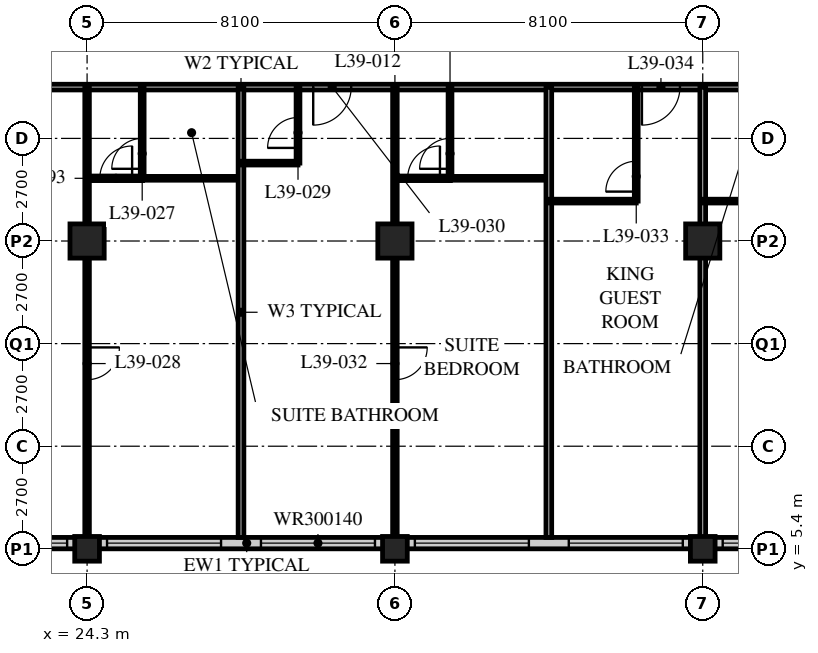
"""IFC4 building model, lengths in metres.
Left out: names, types, materials, properties, quantities, classifications, styles, units other than length and angle.
Written with IfcOpenShell. Run it as: python <this file> out.ifc"""

import sys

from ifc_helpers import new_model, si_unit, direction, frame, frame_2d, origin, origin_2d, place, context, subcontext, project, spatial, rectangle, hollow_rectangle, extrude, element, fill, save


model = new_model("IFC4")
c1 = context("Model", 3, precision=1e-05, world=origin(), true_north=direction((0.0, 1.0)))
c2 = subcontext(c1, "Body", "Model", "MODEL_VIEW")
j1 = project(units=[si_unit("LENGTHUNIT", "METRE"), si_unit("PLANEANGLEUNIT", "RADIAN")], contexts=[c1])
p1 = place(None, origin())
s1 = spatial("IfcSite", under=j1, at=p1, CompositionType="ELEMENT")
p2 = place(p1, origin())
s2 = spatial("IfcBuilding", under=s1, at=p2, CompositionType="ELEMENT")
p3 = place(p2, frame((0.0, 0.0, 151.0)))
s3 = spatial("IfcBuildingStorey", under=s2, at=p3, CompositionType="ELEMENT", Elevation=151.0)
p4 = place(p3, frame((24.3, 5.4, 0.0), z_axis=(0.0, 0.0, 1.0), x_axis=(1.0, 0.0, 0.0)))
e1 = element("IfcColumn", 1, at=p4, inside=s3, PredefinedType="COLUMN", context=c2, shape_type="SweptSolid", body=[
    extrude(hollow_rectangle(XDim=0.65, YDim=0.65, WallThickness=0.055, at=origin_2d()), origin(), (0.0, 0.0, 1.0), 3.4),
])
p5 = place(p3, frame((24.3, 13.5, 0.0), z_axis=(0.0, 0.0, 1.0), x_axis=(1.0, 0.0, 0.0)))
e2 = element("IfcColumn", 2, at=p5, inside=s3, PredefinedType="COLUMN", context=c2, shape_type="SweptSolid", body=[
    extrude(hollow_rectangle(XDim=0.9, YDim=0.9, WallThickness=0.1, at=origin_2d()), origin(), (0.0, 0.0, 1.0), 3.4),
])
p6 = place(p3, frame((32.4, 5.4, 0.0), z_axis=(0.0, 0.0, 1.0), x_axis=(1.0, 0.0, 0.0)))
e3 = element("IfcColumn", 3, at=p6, inside=s3, PredefinedType="COLUMN", context=c2, shape_type="SweptSolid", body=[
    extrude(hollow_rectangle(XDim=0.65, YDim=0.65, WallThickness=0.055, at=origin_2d()), origin(), (0.0, 0.0, 1.0), 3.4),
])
p7 = place(p3, frame((32.4, 13.5, 0.0), z_axis=(0.0, 0.0, 1.0), x_axis=(1.0, 0.0, 0.0)))
e4 = element("IfcColumn", 4, at=p7, inside=s3, PredefinedType="COLUMN", context=c2, shape_type="SweptSolid", body=[
    extrude(hollow_rectangle(XDim=0.9, YDim=0.9, WallThickness=0.1, at=origin_2d()), origin(), (0.0, 0.0, 1.0), 3.4),
])
p8 = place(p3, frame((40.5, 5.4, 0.0), z_axis=(0.0, 0.0, 1.0), x_axis=(1.0, 0.0, 0.0)))
e5 = element("IfcColumn", 5, at=p8, inside=s3, PredefinedType="COLUMN", context=c2, shape_type="SweptSolid", body=[
    extrude(hollow_rectangle(XDim=0.65, YDim=0.65, WallThickness=0.055, at=origin_2d()), origin(), (0.0, 0.0, 1.0), 3.4),
])
p9 = place(p3, frame((40.5, 13.5, 0.0), z_axis=(0.0, 0.0, 1.0), x_axis=(1.0, 0.0, 0.0)))
e6 = element("IfcColumn", 6, at=p9, inside=s3, PredefinedType="COLUMN", context=c2, shape_type="SweptSolid", body=[
    extrude(hollow_rectangle(XDim=0.9, YDim=0.9, WallThickness=0.1, at=origin_2d()), origin(), (0.0, 0.0, 1.0), 3.4),
])
p10 = place(p3, frame((8.4, 5.55, 0.0), z_axis=(0.0, 0.0, 1.0), x_axis=(1.0, 0.0, 0.0)))
e7 = element("IfcWall", 7, at=p10, inside=s3, PredefinedType="SOLIDWALL", context=c2, shape_type="SweptSolid", body=[
    extrude(rectangle(XDim=40.2, YDim=0.3, at=frame_2d((20.1, 0.0))), origin(), (0.0, 0.0, 1.0), 3.19),
])
p11 = place(p10, frame((0.225, 0.0, 0.9)))
e8 = element("IfcOpeningElement", 8, at=p11, cuts=e7, PredefinedType="OPENING", context=c2, shape_type="SweptSolid", body=[
    extrude(rectangle(XDim=3.0, YDim=1.4, at=frame_2d((1.5, 0.7))), frame((0.0, 0.16, 0.0), z_axis=(0.0, -1.0, 0.0), x_axis=(1.0, 0.0, 0.0)), (0.0, 0.0, 1.0), 0.32),
])
p12 = place(p10, frame((4.275, 0.0, 0.9)))
e9 = element("IfcOpeningElement", 9, at=p12, cuts=e7, PredefinedType="OPENING", context=c2, shape_type="SweptSolid", body=[
    extrude(rectangle(XDim=3.0, YDim=1.4, at=frame_2d((1.5, 0.7))), frame((0.0, 0.16, 0.0), z_axis=(0.0, -1.0, 0.0), x_axis=(1.0, 0.0, 0.0)), (0.0, 0.0, 1.0), 0.32),
])
p13 = place(p10, frame((8.325, 0.0, 0.9)))
e10 = element("IfcOpeningElement", 10, at=p13, cuts=e7, PredefinedType="OPENING", context=c2, shape_type="SweptSolid", body=[
    extrude(rectangle(XDim=3.0, YDim=1.4, at=frame_2d((1.5, 0.7))), frame((0.0, 0.16, 0.0), z_axis=(0.0, -1.0, 0.0), x_axis=(1.0, 0.0, 0.0)), (0.0, 0.0, 1.0), 0.32),
])
p14 = place(p10, frame((12.375, 0.0, 0.9)))
e11 = element("IfcOpeningElement", 11, at=p14, cuts=e7, PredefinedType="OPENING", context=c2, shape_type="SweptSolid", body=[
    extrude(rectangle(XDim=3.0, YDim=1.4, at=frame_2d((1.5, 0.7))), frame((0.0, 0.16, 0.0), z_axis=(0.0, -1.0, 0.0), x_axis=(1.0, 0.0, 0.0)), (0.0, 0.0, 1.0), 0.32),
])
p15 = place(p10, frame((16.425, 0.0, 0.9)))
e12 = element("IfcOpeningElement", 12, at=p15, cuts=e7, PredefinedType="OPENING", context=c2, shape_type="SweptSolid", body=[
    extrude(rectangle(XDim=3.0, YDim=1.4, at=frame_2d((1.5, 0.7))), frame((0.0, 0.16, 0.0), z_axis=(0.0, -1.0, 0.0), x_axis=(1.0, 0.0, 0.0)), (0.0, 0.0, 1.0), 0.32),
])
p16 = place(p10, frame((20.475, 0.0, 0.9)))
e13 = element("IfcOpeningElement", 13, at=p16, cuts=e7, PredefinedType="OPENING", context=c2, shape_type="SweptSolid", body=[
    extrude(rectangle(XDim=3.0, YDim=1.4, at=frame_2d((1.5, 0.7))), frame((0.0, 0.16, 0.0), z_axis=(0.0, -1.0, 0.0), x_axis=(1.0, 0.0, 0.0)), (0.0, 0.0, 1.0), 0.32),
])
p17 = place(p10, frame((24.525, 0.0, 0.9)))
e14 = element("IfcOpeningElement", 14, at=p17, cuts=e7, PredefinedType="OPENING", context=c2, shape_type="SweptSolid", body=[
    extrude(rectangle(XDim=3.0, YDim=1.4, at=frame_2d((1.5, 0.7))), frame((0.0, 0.16, 0.0), z_axis=(0.0, -1.0, 0.0), x_axis=(1.0, 0.0, 0.0)), (0.0, 0.0, 1.0), 0.32),
])
p18 = place(p10, frame((28.575, 0.0, 0.9)))
e15 = element("IfcOpeningElement", 15, at=p18, cuts=e7, PredefinedType="OPENING", context=c2, shape_type="SweptSolid", body=[
    extrude(rectangle(XDim=3.0, YDim=1.4, at=frame_2d((1.5, 0.7))), frame((0.0, 0.16, 0.0), z_axis=(0.0, -1.0, 0.0), x_axis=(1.0, 0.0, 0.0)), (0.0, 0.0, 1.0), 0.32),
])
p19 = place(p10, frame((32.625, 0.0, 0.9)))
e16 = element("IfcOpeningElement", 16, at=p19, cuts=e7, PredefinedType="OPENING", context=c2, shape_type="SweptSolid", body=[
    extrude(rectangle(XDim=3.0, YDim=1.4, at=frame_2d((1.5, 0.7))), frame((0.0, 0.16, 0.0), z_axis=(0.0, -1.0, 0.0), x_axis=(1.0, 0.0, 0.0)), (0.0, 0.0, 1.0), 0.32),
])
p20 = place(p10, frame((36.675, 0.0, 0.9)))
e17 = element("IfcOpeningElement", 17, at=p20, cuts=e7, PredefinedType="OPENING", context=c2, shape_type="SweptSolid", body=[
    extrude(rectangle(XDim=3.0, YDim=1.4, at=frame_2d((1.5, 0.7))), frame((0.0, 0.16, 0.0), z_axis=(0.0, -1.0, 0.0), x_axis=(1.0, 0.0, 0.0)), (0.0, 0.0, 1.0), 0.32),
])
p21 = place(p3, frame((8.1, 17.55, 0.0), z_axis=(0.0, 0.0, 1.0), x_axis=(1.0, 0.0, 0.0)))
e18 = element("IfcWall", 18, at=p21, inside=s3, PredefinedType="PARTITIONING", context=c2, shape_type="SweptSolid", body=[
    extrude(rectangle(XDim=40.5, YDim=0.15, at=frame_2d((20.25, 0.0))), origin(), (0.0, 0.0, 1.0), 3.19),
])
p22 = place(p21, frame((10.0, 0.0, 0.0)))
e19 = element("IfcOpeningElement", 19, at=p22, cuts=e18, PredefinedType="OPENING", context=c2, shape_type="SweptSolid", body=[
    extrude(rectangle(XDim=1.0, YDim=2.1, at=frame_2d((0.5, 1.05))), frame((0.0, 0.085, 0.0), z_axis=(0.0, -1.0, 0.0), x_axis=(1.0, 0.0, 0.0)), (0.0, 0.0, 1.0), 0.17),
])
p23 = place(p21, frame((22.15, 0.0, 0.0)))
e20 = element("IfcOpeningElement", 20, at=p23, cuts=e18, PredefinedType="OPENING", context=c2, shape_type="SweptSolid", body=[
    extrude(rectangle(XDim=1.0, YDim=2.1, at=frame_2d((0.5, 1.05))), frame((0.0, 0.085, 0.0), z_axis=(0.0, -1.0, 0.0), x_axis=(1.0, 0.0, 0.0)), (0.0, 0.0, 1.0), 0.17),
])
p24 = place(p21, frame((30.8, 0.0, 0.0)))
e21 = element("IfcOpeningElement", 21, at=p24, cuts=e18, PredefinedType="OPENING", context=c2, shape_type="SweptSolid", body=[
    extrude(rectangle(XDim=1.0, YDim=2.1, at=frame_2d((0.5, 1.05))), frame((0.0, 0.085, 0.0), z_axis=(0.0, -1.0, 0.0), x_axis=(1.0, 0.0, 0.0)), (0.0, 0.0, 1.0), 0.17),
])
p25 = place(p21, frame((34.85, 0.0, 0.0)))
e22 = element("IfcOpeningElement", 22, at=p25, cuts=e18, PredefinedType="OPENING", context=c2, shape_type="SweptSolid", body=[
    extrude(rectangle(XDim=1.0, YDim=2.1, at=frame_2d((0.5, 1.05))), frame((0.0, 0.085, 0.0), z_axis=(0.0, -1.0, 0.0), x_axis=(1.0, 0.0, 0.0)), (0.0, 0.0, 1.0), 0.17),
])
p26 = place(p21, frame((1.525, 0.0, 0.0)))
e23 = element("IfcOpeningElement", 23, at=p26, cuts=e18, PredefinedType="OPENING", context=c2, shape_type="SweptSolid", body=[
    extrude(rectangle(XDim=1.0, YDim=2.1, at=frame_2d((0.5, 1.05))), frame((0.0, 0.085, 0.0), z_axis=(0.0, -1.0, 0.0), x_axis=(1.0, 0.0, 0.0)), (0.0, 0.0, 1.0), 0.17),
])
p27 = place(p21, frame((37.975, 0.0, 0.0)))
e24 = element("IfcOpeningElement", 24, at=p27, cuts=e18, PredefinedType="OPENING", context=c2, shape_type="SweptSolid", body=[
    extrude(rectangle(XDim=1.0, YDim=2.1, at=frame_2d((0.5, 1.05))), frame((0.0, 0.085, 0.0), z_axis=(0.0, -1.0, 0.0), x_axis=(1.0, 0.0, 0.0)), (0.0, 0.0, 1.0), 0.17),
])
p28 = place(p3, frame((25.75, 15.15, 0.0), z_axis=(0.0, 0.0, 1.0), x_axis=(1.0, 0.0, 0.0)))
e25 = element("IfcWall", 25, at=p28, inside=s3, PredefinedType="PARTITIONING", context=c2, shape_type="SweptSolid", body=[
    extrude(rectangle(XDim=2.6, YDim=0.1, at=frame_2d((1.3, 0.0))), origin(), (0.0, 0.0, 1.0), 3.19),
])
p29 = place(p3, frame((25.75, 17.55, 0.0), z_axis=(0.0, 0.0, 1.0), x_axis=(0.0, -1.0, 0.0)))
e26 = element("IfcWall", 26, at=p29, inside=s3, PredefinedType="PARTITIONING", context=c2, shape_type="SweptSolid", body=[
    extrude(rectangle(XDim=2.4, YDim=0.1, at=frame_2d((1.2, 0.0))), origin(), (0.0, 0.0, 1.0), 3.19),
])
p30 = place(p29, frame((1.35, 0.0, 0.0)))
e27 = element("IfcOpeningElement", 27, at=p30, cuts=e26, PredefinedType="OPENING", context=c2, shape_type="SweptSolid", body=[
    extrude(rectangle(XDim=0.8, YDim=2.1, at=frame_2d((0.4, 1.05))), frame((0.0, 0.06, 0.0), z_axis=(0.0, -1.0, 0.0), x_axis=(1.0, 0.0, 0.0)), (0.0, 0.0, 1.0), 0.12),
])
p31 = place(p3, frame((24.3, 17.55, 0.0), z_axis=(0.0, 0.0, 1.0), x_axis=(0.0, -1.0, 0.0)))
e28 = element("IfcWall", 28, at=p31, inside=s3, PredefinedType="PARTITIONING", context=c2, shape_type="SweptSolid", body=[
    extrude(rectangle(XDim=11.85, YDim=0.12, at=frame_2d((5.925, 0.0))), origin(), (0.0, 0.0, 1.0), 2.42),
])
p32 = place(p31, frame((6.85, 0.0, 0.0)))
e29 = element("IfcOpeningElement", 29, at=p32, cuts=e28, PredefinedType="OPENING", context=c2, shape_type="SweptSolid", body=[
    extrude(rectangle(XDim=0.85, YDim=2.1, at=frame_2d((0.425, 1.05))), frame((0.0, 0.07, 0.0), z_axis=(0.0, -1.0, 0.0), x_axis=(1.0, 0.0, 0.0)), (0.0, 0.0, 1.0), 0.14),
])
p33 = place(p3, frame((28.35, 17.55, 0.0), z_axis=(0.0, 0.0, 1.0), x_axis=(0.0, -1.0, 0.0)))
e30 = element("IfcWall", 30, at=p33, inside=s3, PredefinedType="PARTITIONING", context=c2, shape_type="SweptSolid", body=[
    extrude(rectangle(XDim=11.85, YDim=0.15, at=frame_2d((5.925, 0.0))), origin(), (0.0, 0.0, 1.0), 3.19),
])
p34 = place(p3, frame((28.35, 15.55, 0.0), z_axis=(0.0, 0.0, 1.0), x_axis=(1.0, 0.0, 0.0)))
e31 = element("IfcWall", 31, at=p34, inside=s3, PredefinedType="PARTITIONING", context=c2, shape_type="SweptSolid", body=[
    extrude(rectangle(XDim=1.5, YDim=0.1, at=frame_2d((0.75, 0.0))), origin(), (0.0, 0.0, 1.0), 3.19),
])
p35 = place(p3, frame((29.85, 17.55, 0.0), z_axis=(0.0, 0.0, 1.0), x_axis=(0.0, -1.0, 0.0)))
e32 = element("IfcWall", 32, at=p35, inside=s3, PredefinedType="PARTITIONING", context=c2, shape_type="SweptSolid", body=[
    extrude(rectangle(XDim=2.0, YDim=0.1, at=frame_2d((1.0, 0.0))), origin(), (0.0, 0.0, 1.0), 3.19),
])
p36 = place(p35, frame((0.8, 0.0, 0.0)))
e33 = element("IfcOpeningElement", 33, at=p36, cuts=e32, PredefinedType="OPENING", context=c2, shape_type="SweptSolid", body=[
    extrude(rectangle(XDim=0.8, YDim=2.1, at=frame_2d((0.4, 1.05))), frame((0.0, 0.06, 0.0), z_axis=(0.0, -1.0, 0.0), x_axis=(1.0, 0.0, 0.0)), (0.0, 0.0, 1.0), 0.12),
])
p37 = place(p3, frame((33.85, 15.15, 0.0), z_axis=(0.0, 0.0, 1.0), x_axis=(1.0, 0.0, 0.0)))
e34 = element("IfcWall", 34, at=p37, inside=s3, PredefinedType="PARTITIONING", context=c2, shape_type="SweptSolid", body=[
    extrude(rectangle(XDim=2.6, YDim=0.1, at=frame_2d((1.3, 0.0))), origin(), (0.0, 0.0, 1.0), 3.19),
])
p38 = place(p3, frame((33.85, 17.55, 0.0), z_axis=(0.0, 0.0, 1.0), x_axis=(0.0, -1.0, 0.0)))
e35 = element("IfcWall", 35, at=p38, inside=s3, PredefinedType="PARTITIONING", context=c2, shape_type="SweptSolid", body=[
    extrude(rectangle(XDim=2.4, YDim=0.1, at=frame_2d((1.2, 0.0))), origin(), (0.0, 0.0, 1.0), 3.19),
])
p39 = place(p38, frame((1.35, 0.0, 0.0)))
e36 = element("IfcOpeningElement", 36, at=p39, cuts=e35, PredefinedType="OPENING", context=c2, shape_type="SweptSolid", body=[
    extrude(rectangle(XDim=0.8, YDim=2.1, at=frame_2d((0.4, 1.05))), frame((0.0, 0.06, 0.0), z_axis=(0.0, -1.0, 0.0), x_axis=(1.0, 0.0, 0.0)), (0.0, 0.0, 1.0), 0.12),
])
p40 = place(p3, frame((32.4, 17.55, 0.0), z_axis=(0.0, 0.0, 1.0), x_axis=(0.0, -1.0, 0.0)))
e37 = element("IfcWall", 37, at=p40, inside=s3, PredefinedType="PARTITIONING", context=c2, shape_type="SweptSolid", body=[
    extrude(rectangle(XDim=11.85, YDim=0.12, at=frame_2d((5.925, 0.0))), origin(), (0.0, 0.0, 1.0), 2.42),
])
p41 = place(p40, frame((6.85, 0.0, 0.0)))
e38 = element("IfcOpeningElement", 38, at=p41, cuts=e37, PredefinedType="OPENING", context=c2, shape_type="SweptSolid", body=[
    extrude(rectangle(XDim=0.85, YDim=2.1, at=frame_2d((0.425, 1.05))), frame((0.0, 0.07, 0.0), z_axis=(0.0, -1.0, 0.0), x_axis=(1.0, 0.0, 0.0)), (0.0, 0.0, 1.0), 0.14),
])
p42 = place(p3, frame((36.45, 17.55, 0.0), z_axis=(0.0, 0.0, 1.0), x_axis=(0.0, -1.0, 0.0)))
e39 = element("IfcWall", 39, at=p42, inside=s3, PredefinedType="PARTITIONING", context=c2, shape_type="SweptSolid", body=[
    extrude(rectangle(XDim=11.85, YDim=0.15, at=frame_2d((5.925, 0.0))), origin(), (0.0, 0.0, 1.0), 3.19),
])
p43 = place(p3, frame((36.45, 14.55, 0.0), z_axis=(0.0, 0.0, 1.0), x_axis=(1.0, 0.0, 0.0)))
e40 = element("IfcWall", 40, at=p43, inside=s3, PredefinedType="PARTITIONING", context=c2, shape_type="SweptSolid", body=[
    extrude(rectangle(XDim=2.3, YDim=0.1, at=frame_2d((1.15, 0.0))), origin(), (0.0, 0.0, 1.0), 3.19),
])
p44 = place(p3, frame((38.75, 17.55, 0.0), z_axis=(0.0, 0.0, 1.0), x_axis=(0.0, -1.0, 0.0)))
e41 = element("IfcWall", 41, at=p44, inside=s3, PredefinedType="PARTITIONING", context=c2, shape_type="SweptSolid", body=[
    extrude(rectangle(XDim=3.0, YDim=0.1, at=frame_2d((1.5, 0.0))), origin(), (0.0, 0.0, 1.0), 3.19),
])
p45 = place(p44, frame((1.95, 0.0, 0.0)))
e42 = element("IfcOpeningElement", 42, at=p45, cuts=e41, PredefinedType="OPENING", context=c2, shape_type="SweptSolid", body=[
    extrude(rectangle(XDim=0.8, YDim=2.1, at=frame_2d((0.4, 1.05))), frame((0.0, 0.06, 0.0), z_axis=(0.0, -1.0, 0.0), x_axis=(1.0, 0.0, 0.0)), (0.0, 0.0, 1.0), 0.12),
])
p46 = place(p3, frame((40.5, 17.55, 0.0), z_axis=(0.0, 0.0, 1.0), x_axis=(0.0, -1.0, 0.0)))
e43 = element("IfcWall", 43, at=p46, inside=s3, PredefinedType="PARTITIONING", context=c2, shape_type="SweptSolid", body=[
    extrude(rectangle(XDim=11.85, YDim=0.15, at=frame_2d((5.925, 0.0))), origin(), (0.0, 0.0, 1.0), 2.42),
])
p47 = place(p3, frame((40.5, 14.55, 0.0), z_axis=(0.0, 0.0, 1.0), x_axis=(1.0, 0.0, 0.0)))
e44 = element("IfcWall", 44, at=p47, inside=s3, PredefinedType="PARTITIONING", context=c2, shape_type="SweptSolid", body=[
    extrude(rectangle(XDim=2.3, YDim=0.1, at=frame_2d((1.15, 0.0))), origin(), (0.0, 0.0, 1.0), 3.19),
])
p48 = place(p3, frame((25.76, 15.15, 0.0), z_axis=(0.0, 0.0, 1.0), x_axis=(-1.0, 0.0, 0.0)))
e45 = element("IfcWall", 45, at=p48, inside=s3, PredefinedType="PARTITIONING", context=c2, shape_type="SweptSolid", body=[
    extrude(rectangle(XDim=1.46, YDim=0.12, at=frame_2d((0.73, 0.0))), origin(), (0.0, 0.0, 1.0), 3.19),
])
p49 = place(p48, frame((0.275, 0.0, 0.0)))
e46 = element("IfcOpeningElement", 46, at=p49, cuts=e45, PredefinedType="OPENING", context=c2, shape_type="SweptSolid", body=[
    extrude(rectangle(XDim=0.85, YDim=2.1, at=frame_2d((0.425, 1.05))), frame((0.0, 0.07, 0.0), z_axis=(0.0, -1.0, 0.0), x_axis=(1.0, 0.0, 0.0)), (0.0, 0.0, 1.0), 0.14),
])
p50 = place(p3, frame((33.86, 15.15, 0.0), z_axis=(0.0, 0.0, 1.0), x_axis=(-1.0, 0.0, 0.0)))
e47 = element("IfcWall", 47, at=p50, inside=s3, PredefinedType="PARTITIONING", context=c2, shape_type="SweptSolid", body=[
    extrude(rectangle(XDim=1.46, YDim=0.12, at=frame_2d((0.73, 0.0))), origin(), (0.0, 0.0, 1.0), 3.19),
])
p51 = place(p50, frame((0.275, 0.0, 0.0)))
e48 = element("IfcOpeningElement", 48, at=p51, cuts=e47, PredefinedType="OPENING", context=c2, shape_type="SweptSolid", body=[
    extrude(rectangle(XDim=0.85, YDim=2.1, at=frame_2d((0.425, 1.05))), frame((0.0, 0.07, 0.0), z_axis=(0.0, -1.0, 0.0), x_axis=(1.0, 0.0, 0.0)), (0.0, 0.0, 1.0), 0.14),
])
p52 = place(p14, origin())
e49 = element("IfcWindow", 49, at=p52, inside=s3, PartitioningType="SINGLE_PANEL", PredefinedType="WINDOW", context=c2, shape_type="SweptSolid", body=[
    extrude(rectangle(XDim=3.0, YDim=1.4, at=frame_2d((1.5, 0.7))), frame((0.0, 0.03, 0.0), z_axis=(0.0, -1.0, 0.0), x_axis=(1.0, 0.0, 0.0)), (0.0, 0.0, 1.0), 0.06),
])
fill(e11, e49)
p53 = place(p15, origin())
e50 = element("IfcWindow", 50, at=p53, inside=s3, PartitioningType="SINGLE_PANEL", PredefinedType="WINDOW", context=c2, shape_type="SweptSolid", body=[
    extrude(rectangle(XDim=3.0, YDim=1.4, at=frame_2d((1.5, 0.7))), frame((0.0, 0.03, 0.0), z_axis=(0.0, -1.0, 0.0), x_axis=(1.0, 0.0, 0.0)), (0.0, 0.0, 1.0), 0.06),
])
fill(e12, e50)
p54 = place(p16, origin())
e51 = element("IfcWindow", 51, at=p54, inside=s3, PartitioningType="SINGLE_PANEL", PredefinedType="WINDOW", context=c2, shape_type="SweptSolid", body=[
    extrude(rectangle(XDim=3.0, YDim=1.4, at=frame_2d((1.5, 0.7))), frame((0.0, 0.03, 0.0), z_axis=(0.0, -1.0, 0.0), x_axis=(1.0, 0.0, 0.0)), (0.0, 0.0, 1.0), 0.06),
])
fill(e13, e51)
p55 = place(p17, origin())
e52 = element("IfcWindow", 52, at=p55, inside=s3, PartitioningType="SINGLE_PANEL", PredefinedType="WINDOW", context=c2, shape_type="SweptSolid", body=[
    extrude(rectangle(XDim=3.0, YDim=1.4, at=frame_2d((1.5, 0.7))), frame((0.0, 0.03, 0.0), z_axis=(0.0, -1.0, 0.0), x_axis=(1.0, 0.0, 0.0)), (0.0, 0.0, 1.0), 0.06),
])
fill(e14, e52)
p56 = place(p18, origin())
e53 = element("IfcWindow", 53, at=p56, inside=s3, PartitioningType="SINGLE_PANEL", PredefinedType="WINDOW", context=c2, shape_type="SweptSolid", body=[
    extrude(rectangle(XDim=3.0, YDim=1.4, at=frame_2d((1.5, 0.7))), frame((0.0, 0.03, 0.0), z_axis=(0.0, -1.0, 0.0), x_axis=(1.0, 0.0, 0.0)), (0.0, 0.0, 1.0), 0.06),
])
fill(e15, e53)
p57 = place(p19, origin())
e54 = element("IfcWindow", 54, at=p57, inside=s3, PartitioningType="SINGLE_PANEL", PredefinedType="WINDOW", context=c2, shape_type="SweptSolid", body=[
    extrude(rectangle(XDim=3.0, YDim=1.4, at=frame_2d((1.5, 0.7))), frame((0.0, 0.03, 0.0), z_axis=(0.0, -1.0, 0.0), x_axis=(1.0, 0.0, 0.0)), (0.0, 0.0, 1.0), 0.06),
])
fill(e16, e54)
p58 = place(p30, origin())
e55 = element("IfcDoor", 55, at=p58, inside=s3, OperationType="SINGLE_SWING_LEFT", PredefinedType="DOOR", context=c2, shape_type="SweptSolid", body=[
    extrude(rectangle(XDim=0.8, YDim=2.1, at=frame_2d((0.4, 1.05))), frame((0.0, 0.025, 0.0), z_axis=(0.0, -1.0, 0.0), x_axis=(1.0, 0.0, 0.0)), (0.0, 0.0, 1.0), 0.05),
])
fill(e27, e55)
p59 = place(p32, origin())
e56 = element("IfcDoor", 56, at=p59, inside=s3, OperationType="SINGLE_SWING_LEFT", PredefinedType="DOOR", context=c2, shape_type="SweptSolid", body=[
    extrude(rectangle(XDim=0.85, YDim=2.1, at=frame_2d((0.425, 1.05))), frame((0.0, 0.025, 0.0), z_axis=(0.0, -1.0, 0.0), x_axis=(1.0, 0.0, 0.0)), (0.0, 0.0, 1.0), 0.05),
])
fill(e29, e56)
p60 = place(p36, origin())
e57 = element("IfcDoor", 57, at=p60, inside=s3, OperationType="SINGLE_SWING_LEFT", PredefinedType="DOOR", context=c2, shape_type="SweptSolid", body=[
    extrude(rectangle(XDim=0.8, YDim=2.1, at=frame_2d((0.4, 1.05))), frame((0.0, 0.025, 0.0), z_axis=(0.0, -1.0, 0.0), x_axis=(1.0, 0.0, 0.0)), (0.0, 0.0, 1.0), 0.05),
])
fill(e33, e57)
p61 = place(p23, origin())
e58 = element("IfcDoor", 58, at=p61, inside=s3, OperationType="SINGLE_SWING_RIGHT", PredefinedType="DOOR", context=c2, shape_type="SweptSolid", body=[
    extrude(rectangle(XDim=1.0, YDim=2.1, at=frame_2d((0.5, 1.05))), frame((0.0, 0.025, 0.0), z_axis=(0.0, -1.0, 0.0), x_axis=(1.0, 0.0, 0.0)), (0.0, 0.0, 1.0), 0.05),
])
fill(e20, e58)
p62 = place(p39, origin())
e59 = element("IfcDoor", 59, at=p62, inside=s3, OperationType="SINGLE_SWING_LEFT", PredefinedType="DOOR", context=c2, shape_type="SweptSolid", body=[
    extrude(rectangle(XDim=0.8, YDim=2.1, at=frame_2d((0.4, 1.05))), frame((0.0, 0.025, 0.0), z_axis=(0.0, -1.0, 0.0), x_axis=(1.0, 0.0, 0.0)), (0.0, 0.0, 1.0), 0.05),
])
fill(e36, e59)
p63 = place(p41, origin())
e60 = element("IfcDoor", 60, at=p63, inside=s3, OperationType="SINGLE_SWING_LEFT", PredefinedType="DOOR", context=c2, shape_type="SweptSolid", body=[
    extrude(rectangle(XDim=0.85, YDim=2.1, at=frame_2d((0.425, 1.05))), frame((0.0, 0.025, 0.0), z_axis=(0.0, -1.0, 0.0), x_axis=(1.0, 0.0, 0.0)), (0.0, 0.0, 1.0), 0.05),
])
fill(e38, e60)
p64 = place(p45, origin())
e61 = element("IfcDoor", 61, at=p64, inside=s3, OperationType="SINGLE_SWING_LEFT", PredefinedType="DOOR", context=c2, shape_type="SweptSolid", body=[
    extrude(rectangle(XDim=0.8, YDim=2.1, at=frame_2d((0.4, 1.05))), frame((0.0, 0.025, 0.0), z_axis=(0.0, -1.0, 0.0), x_axis=(1.0, 0.0, 0.0)), (0.0, 0.0, 1.0), 0.05),
])
fill(e42, e61)
p65 = place(p24, origin())
e62 = element("IfcDoor", 62, at=p65, inside=s3, OperationType="SINGLE_SWING_RIGHT", PredefinedType="DOOR", context=c2, shape_type="SweptSolid", body=[
    extrude(rectangle(XDim=1.0, YDim=2.1, at=frame_2d((0.5, 1.05))), frame((0.0, 0.025, 0.0), z_axis=(0.0, -1.0, 0.0), x_axis=(1.0, 0.0, 0.0)), (0.0, 0.0, 1.0), 0.05),
])
fill(e21, e62)
p66 = place(p49, origin())
e63 = element("IfcDoor", 63, at=p66, inside=s3, OperationType="SINGLE_SWING_RIGHT", PredefinedType="DOOR", context=c2, shape_type="SweptSolid", body=[
    extrude(rectangle(XDim=0.85, YDim=2.1, at=frame_2d((0.425, 1.05))), frame((0.0, 0.025, 0.0), z_axis=(0.0, -1.0, 0.0), x_axis=(1.0, 0.0, 0.0)), (0.0, 0.0, 1.0), 0.05),
])
fill(e46, e63)
p67 = place(p51, origin())
e64 = element("IfcDoor", 64, at=p67, inside=s3, OperationType="SINGLE_SWING_RIGHT", PredefinedType="DOOR", context=c2, shape_type="SweptSolid", body=[
    extrude(rectangle(XDim=0.85, YDim=2.1, at=frame_2d((0.425, 1.05))), frame((0.0, 0.025, 0.0), z_axis=(0.0, -1.0, 0.0), x_axis=(1.0, 0.0, 0.0)), (0.0, 0.0, 1.0), 0.05),
])
fill(e48, e64)
save(model, sys.argv[1])
